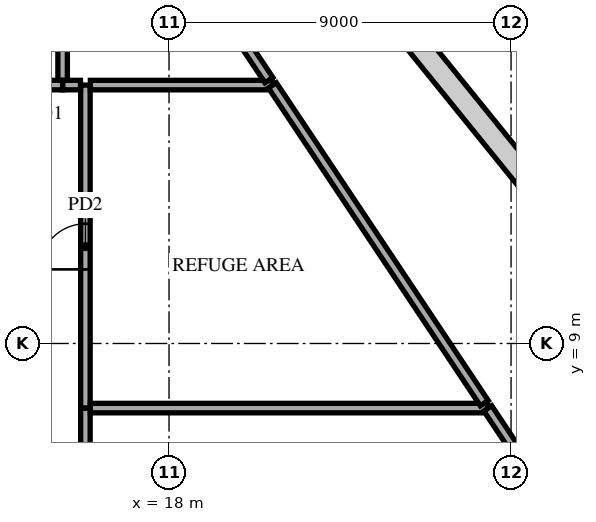
"""IFC4 building model, lengths in metres.
Left out: names, types, materials, properties, quantities, classifications, styles, units other than length and angle.
Written with IfcOpenShell. Run it as: python <this file> out.ifc"""

import sys

from ifc_helpers import new_model, si_unit, direction, frame, frame_2d, origin, place, context, subcontext, project, spatial, rectangle, extrude, element, fill, save


model = new_model("IFC4")
c1 = context("Model", 3, precision=1e-05, world=origin(), true_north=direction((0.0, 1.0)))
c2 = subcontext(c1, "Body", "Model", "MODEL_VIEW")
j1 = project(units=[si_unit("LENGTHUNIT", "METRE"), si_unit("PLANEANGLEUNIT", "RADIAN")], contexts=[c1])
p1 = place(None, origin())
s1 = spatial("IfcSite", under=j1, at=p1, CompositionType="ELEMENT")
p2 = place(p1, origin())
s2 = spatial("IfcBuilding", under=s1, at=p2, CompositionType="ELEMENT")
p3 = place(p2, frame((0.0, 0.0, 183.7)))
s3 = spatial("IfcBuildingStorey", under=s2, at=p3, CompositionType="ELEMENT", Elevation=183.7)
p4 = place(p3, frame((15.8, -4.695, 0.0), z_axis=(0.0, 0.0, 1.0), x_axis=(0.0, 1.0, 0.0)))
e1 = element("IfcWall", 1, at=p4, inside=s3, PredefinedType="PARTITIONING", context=c2, shape_type="SweptSolid", body=[
    extrude(rectangle(XDim=11.995, YDim=0.25, at=frame_2d((5.998, 0.0))), origin(), (0.0, 0.0, 1.0), 4.65),
])
p5 = place(p4, frame((4.995, 0.0, 0.0)))
e2 = element("IfcOpeningElement", 2, at=p5, cuts=e1, PredefinedType="OPENING", context=c2, shape_type="SweptSolid", body=[
    extrude(rectangle(XDim=2.0, YDim=2.1, at=frame_2d((1.0, 1.05))), frame((0.0, 0.135, 0.0), z_axis=(0.0, -1.0, 0.0), x_axis=(1.0, 0.0, 0.0)), (0.0, 0.0, 1.0), 0.27),
])
p6 = place(p3, frame((15.8, 7.305, 0.0), z_axis=(0.0, 0.0, 1.0), x_axis=(0.0, 1.0, 0.0)))
e3 = element("IfcWall", 3, at=p6, inside=s3, PredefinedType="PARTITIONING", context=c2, shape_type="SweptSolid", body=[
    extrude(rectangle(XDim=8.495, YDim=0.25, at=frame_2d((4.248, 0.0))), origin(), (0.0, 0.0, 1.0), 4.65),
])
p7 = place(p6, frame((3.645, 0.0, 0.0)))
e4 = element("IfcOpeningElement", 4, at=p7, cuts=e3, PredefinedType="OPENING", context=c2, shape_type="SweptSolid", body=[
    extrude(rectangle(XDim=1.2, YDim=2.1, at=frame_2d((0.6, 1.05))), frame((0.0, 0.135, 0.0), z_axis=(0.0, -1.0, 0.0), x_axis=(1.0, 0.0, 0.0)), (0.0, 0.0, 1.0), 0.27),
])
p8 = place(p3, frame((15.93, 7.3, 0.0), z_axis=(0.0, 0.0, 1.0), x_axis=(1.0, 0.0, 0.0)))
e5 = element("IfcWall", 5, at=p8, inside=s3, PredefinedType="PARTITIONING", context=c2, shape_type="SweptSolid", body=[
    extrude(rectangle(XDim=10.452, YDim=0.25, at=frame_2d((5.226, 0.0))), origin(), (0.0, 0.0, 1.0), 4.65),
])
p9 = place(p3, frame((26.387, 7.292, 0.0), z_axis=(0.0, 0.0, 1.0), x_axis=(0.554755527302, -0.832013404296, 0.0)))
e6 = element("IfcWall", 6, at=p9, inside=s3, PredefinedType="PARTITIONING", context=c2, shape_type="SweptSolid", body=[
    extrude(rectangle(XDim=3.055, YDim=0.25, at=frame_2d((1.527, 0.0))), origin(), (0.0, 0.0, 1.0), 5.22),
])
p10 = place(p3, frame((12.791, 15.8, 0.0), z_axis=(0.0, 0.0, 1.0), x_axis=(1.0, 0.0, 0.0)))
e7 = element("IfcWall", 7, at=p10, inside=s3, PredefinedType="PARTITIONING", context=c2, shape_type="SweptSolid", body=[
    extrude(rectangle(XDim=2.409, YDim=0.25, at=frame_2d((1.204, 0.0))), origin(), (0.0, 0.0, 1.0), 4.65),
])
p11 = place(p10, frame((0.696, 0.0, 0.0)))
e8 = element("IfcOpeningElement", 8, at=p11, cuts=e7, PredefinedType="OPENING", context=c2, shape_type="SweptSolid", body=[
    extrude(rectangle(XDim=1.0, YDim=2.1, at=frame_2d((0.5, 1.05))), frame((0.0, 0.135, 0.0), z_axis=(0.0, -1.0, 0.0), x_axis=(1.0, 0.0, 0.0)), (0.0, 0.0, 1.0), 0.27),
])
p12 = place(p3, frame((15.205, 15.8, 0.0), z_axis=(0.0, 0.0, 1.0), x_axis=(1.0, 0.0, 0.0)))
e9 = element("IfcWall", 9, at=p12, inside=s3, PredefinedType="PARTITIONING", context=c2, shape_type="SweptSolid", body=[
    extrude(rectangle(XDim=0.465, YDim=0.25, at=frame_2d((0.232, 0.0))), origin(), (0.0, 0.0, 1.0), 4.65),
])
p13 = place(p3, frame((15.93, 15.8, 0.0), z_axis=(0.0, 0.0, 1.0), x_axis=(1.0, 0.0, 0.0)))
e10 = element("IfcWall", 10, at=p13, inside=s3, PredefinedType="PARTITIONING", context=c2, shape_type="SweptSolid", body=[
    extrude(rectangle(XDim=4.785, YDim=0.25, at=frame_2d((2.393, 0.0))), origin(), (0.0, 0.0, 1.0), 5.22),
])
p14 = place(p3, frame((20.72, 15.792, 0.0), z_axis=(0.0, 0.0, 1.0), x_axis=(0.554728223717, -0.832031608661, 0.0)))
e11 = element("IfcWall", 11, at=p14, inside=s3, PredefinedType="PARTITIONING", context=c2, shape_type="SweptSolid", body=[
    extrude(rectangle(XDim=10.051, YDim=0.25, at=frame_2d((5.025, 0.0))), origin(), (0.0, 0.0, 1.0), 4.65),
])
p15 = place(p3, frame((15.324, 23.885, 0.0), z_axis=(0.0, 0.0, 1.0), x_axis=(0.554717873221, -0.832038509403, 0.0)))
e12 = element("IfcWall", 12, at=p15, inside=s3, PredefinedType="PARTITIONING", context=c2, shape_type="SweptSolid", body=[
    extrude(rectangle(XDim=9.562, YDim=0.25, at=frame_2d((4.781, 0.0))), origin(), (0.0, 0.0, 1.0), 4.386),
])
p16 = place(p3, frame((15.2, 15.93, 0.0), z_axis=(0.0, 0.0, 1.0), x_axis=(0.0, 1.0, 0.0)))
e13 = element("IfcWall", 13, at=p16, inside=s3, PredefinedType="PARTITIONING", context=c2, shape_type="SweptSolid", body=[
    extrude(rectangle(XDim=7.987, YDim=0.25, at=frame_2d((3.993, 0.0))), origin(), (0.0, 0.0, 1.0), 4.386),
])
p17 = place(p16, frame((3.326, 0.0, 0.0)))
e14 = element("IfcOpeningElement", 14, at=p17, cuts=e13, PredefinedType="OPENING", context=c2, shape_type="SweptSolid", body=[
    extrude(rectangle(XDim=1.2, YDim=2.1, at=frame_2d((0.6, 1.05))), frame((0.0, 0.135, 0.0), z_axis=(0.0, -1.0, 0.0), x_axis=(1.0, 0.0, 0.0)), (0.0, 0.0, 1.0), 0.27),
])
p18 = place(p3, frame((36.47, 2.156, 0.0), z_axis=(0.0, 0.0, 1.0), x_axis=(-0.62932061547, 0.777145779725, 0.0)))
e15 = element("IfcWall", 15, at=p18, inside=s3, PredefinedType="STANDARD", context=c2, shape_type="SweptSolid", body=[
    extrude(rectangle(XDim=42.176, YDim=0.6, at=frame_2d((21.088, 0.0))), origin(), (0.0, 0.0, 1.0), 5.22),
])
p19 = place(p18, frame((1.138, 0.0, 0.6)))
e16 = element("IfcOpeningElement", 16, at=p19, cuts=e15, PredefinedType="OPENING", context=c2, shape_type="SweptSolid", body=[
    extrude(rectangle(XDim=2.3, YDim=4.17, at=frame_2d((1.15, 2.085))), frame((0.0, 0.31, 0.0), z_axis=(0.0, -1.0, 0.0), x_axis=(1.0, 0.0, 0.0)), (0.0, 0.0, 1.0), 0.62),
])
p20 = place(p18, frame((5.776, 0.0, 0.6)))
e17 = element("IfcOpeningElement", 17, at=p20, cuts=e15, PredefinedType="OPENING", context=c2, shape_type="SweptSolid", body=[
    extrude(rectangle(XDim=2.3, YDim=4.17, at=frame_2d((1.15, 2.085))), frame((0.0, 0.31, 0.0), z_axis=(0.0, -1.0, 0.0), x_axis=(1.0, 0.0, 0.0)), (0.0, 0.0, 1.0), 0.62),
])
p21 = place(p18, frame((33.976, 0.0, 0.6)))
e18 = element("IfcOpeningElement", 18, at=p21, cuts=e15, PredefinedType="OPENING", context=c2, shape_type="SweptSolid", body=[
    extrude(rectangle(XDim=2.3, YDim=4.17, at=frame_2d((1.15, 2.085))), frame((0.0, 0.31, 0.0), z_axis=(0.0, -1.0, 0.0), x_axis=(1.0, 0.0, 0.0)), (0.0, 0.0, 1.0), 0.62),
])
p22 = place(p18, frame((38.676, 0.0, 0.6)))
e19 = element("IfcOpeningElement", 19, at=p22, cuts=e15, PredefinedType="OPENING", context=c2, shape_type="SweptSolid", body=[
    extrude(rectangle(XDim=2.3, YDim=4.17, at=frame_2d((1.15, 2.085))), frame((0.0, 0.31, 0.0), z_axis=(0.0, -1.0, 0.0), x_axis=(1.0, 0.0, 0.0)), (0.0, 0.0, 1.0), 0.62),
])
p23 = place(p7, origin())
e20 = element("IfcDoor", 20, at=p23, inside=s3, OperationType="SINGLE_SWING_RIGHT", PredefinedType="DOOR", context=c2, shape_type="SweptSolid", body=[
    extrude(rectangle(XDim=1.2, YDim=2.1, at=frame_2d((0.6, 1.05))), frame((0.0, 0.025, 0.0), z_axis=(0.0, -1.0, 0.0), x_axis=(1.0, 0.0, 0.0)), (0.0, 0.0, 1.0), 0.05),
])
fill(e4, e20)
save(model, sys.argv[1])
